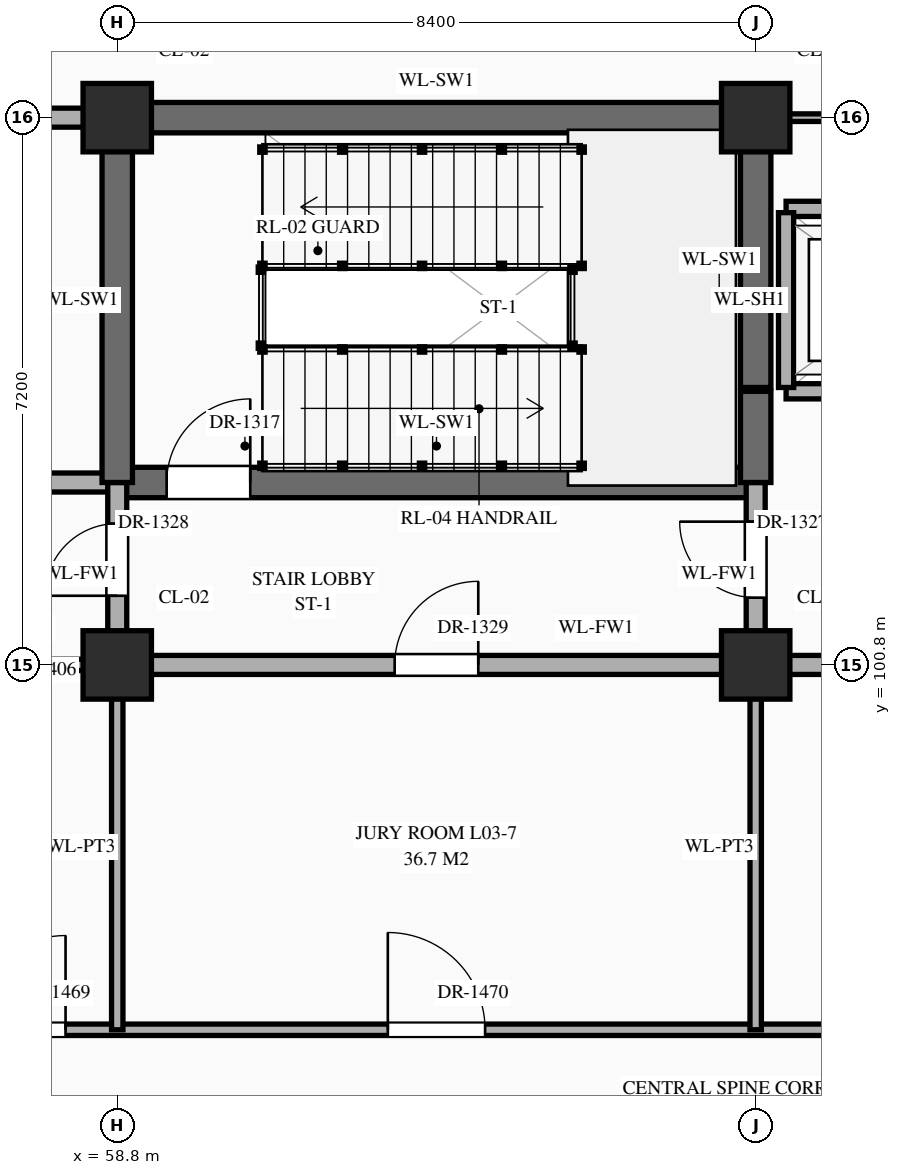
"""IFC4 building model, lengths in metres.
Left out: names, types, materials, properties, quantities, classifications, styles, units other than length and angle.
Written with IfcOpenShell. Run it as: python <this file> out.ifc"""

import sys

from ifc_helpers import new_model, si_unit, direction, frame, frame_2d, origin, origin_2d, place, context, subcontext, project, spatial, rectangle, extrude, element, fill, save


model = new_model("IFC4")
c1 = context("Model", 3, precision=1e-05, world=origin(), true_north=direction((0.0, 1.0)))
c2 = subcontext(c1, "Body", "Model", "MODEL_VIEW")
j1 = project(units=[si_unit("LENGTHUNIT", "METRE"), si_unit("PLANEANGLEUNIT", "RADIAN")], contexts=[c1])
p1 = place(None, origin())
s1 = spatial("IfcSite", under=j1, at=p1, CompositionType="ELEMENT")
p2 = place(p1, origin())
s2 = spatial("IfcBuilding", under=s1, at=p2, CompositionType="ELEMENT")
p3 = place(p2, frame((0.0, 0.0, 10.8)))
s3 = spatial("IfcBuildingStorey", under=s2, at=p3, CompositionType="ELEMENT", Elevation=10.8)
for number, where, z_axis, x_axis in (
    (1, (58.8, 100.8, 0.0), (0.0, 0.0, 1.0), (1.0, 0.0, 0.0)),
    (2, (58.8, 108.0, 0.0), (0.0, 0.0, 1.0), (1.0, 0.0, 0.0)),
    (3, (67.2, 100.8, 0.0), (0.0, 0.0, 1.0), (1.0, 0.0, 0.0)),
    (4, (67.2, 108.0, 0.0), (0.0, 0.0, 1.0), (1.0, 0.0, 0.0)),
):
    element("IfcColumn", number, at=place(p3, frame(where, z_axis=z_axis, x_axis=x_axis)), inside=s3, PredefinedType="COLUMN", context=c2, shape_type="SweptSolid", body=[
        extrude(rectangle(XDim=0.9, YDim=0.9, at=origin_2d()), origin(), (0.0, 0.0, 1.0), 5.4),
    ])
p4 = place(p3, frame((56.2, 96.0, 0.0), z_axis=(0.0, 0.0, 1.0), x_axis=(1.0, 0.0, 0.0)))
e5 = element("IfcWall", 5, at=p4, inside=s3, PredefinedType="STANDARD", context=c2, shape_type="SweptSolid", body=[
    extrude(rectangle(XDim=27.8, YDim=0.15, at=frame_2d((13.9, 0.0))), origin(), (0.0, 0.0, 1.0), 5.12),
])
p5 = place(p4, frame((0.68, 0.0, 0.0)))
e6 = element("IfcOpeningElement", 6, at=p5, cuts=e5, PredefinedType="OPENING", context=c2, shape_type="SweptSolid", body=[
    extrude(rectangle(XDim=1.24, YDim=2.3, at=frame_2d((0.62, 1.15))), frame((0.0, 0.087, 0.0), z_axis=(0.0, -1.0, 0.0), x_axis=(1.0, 0.0, 0.0)), (0.0, 0.0, 1.0), 0.174),
])
p6 = place(p4, frame((6.16, 0.0, 0.0)))
e7 = element("IfcOpeningElement", 7, at=p6, cuts=e5, PredefinedType="OPENING", context=c2, shape_type="SweptSolid", body=[
    extrude(rectangle(XDim=1.28, YDim=2.35, at=frame_2d((0.64, 1.175))), frame((0.0, 0.087, 0.0), z_axis=(0.0, -1.0, 0.0), x_axis=(1.0, 0.0, 0.0)), (0.0, 0.0, 1.0), 0.174),
])
p7 = place(p4, frame((14.73, 0.0, 0.0)))
e8 = element("IfcOpeningElement", 8, at=p7, cuts=e5, PredefinedType="OPENING", context=c2, shape_type="SweptSolid", body=[
    extrude(rectangle(XDim=0.94, YDim=2.3, at=frame_2d((0.47, 1.15))), frame((0.0, 0.087, 0.0), z_axis=(0.0, -1.0, 0.0), x_axis=(1.0, 0.0, 0.0)), (0.0, 0.0, 1.0), 0.174),
])
p8 = place(p4, frame((23.11, 0.0, 0.0)))
e9 = element("IfcOpeningElement", 9, at=p8, cuts=e5, PredefinedType="OPENING", context=c2, shape_type="SweptSolid", body=[
    extrude(rectangle(XDim=0.98, YDim=2.35, at=frame_2d((0.49, 1.175))), frame((0.0, 0.087, 0.0), z_axis=(0.0, -1.0, 0.0), x_axis=(1.0, 0.0, 0.0)), (0.0, 0.0, 1.0), 0.174),
])
p9 = place(p3, frame((56.2, 100.8, 0.0), z_axis=(0.0, 0.0, 1.0), x_axis=(1.0, 0.0, 0.0)))
e10 = element("IfcWall", 10, at=p9, inside=s3, PredefinedType="STANDARD", context=c2, shape_type="SweptSolid", body=[
    extrude(rectangle(XDim=2.6, YDim=0.15, at=frame_2d((1.3, 0.0))), origin(), (0.0, 0.0, 1.0), 4.27),
])
p10 = place(p9, frame((0.585, 0.0, 0.0)))
e11 = element("IfcOpeningElement", 11, at=p10, cuts=e10, PredefinedType="OPENING", context=c2, shape_type="SweptSolid", body=[
    extrude(rectangle(XDim=1.06, YDim=2.4, at=frame_2d((0.53, 1.2))), frame((0.0, 0.087, 0.0), z_axis=(0.0, -1.0, 0.0), x_axis=(1.0, 0.0, 0.0)), (0.0, 0.0, 1.0), 0.174),
])
p11 = place(p3, frame((58.8, 100.8, 0.0), z_axis=(0.0, 0.0, 1.0), x_axis=(1.0, 0.0, 0.0)))
e12 = element("IfcWall", 12, at=p11, inside=s3, PredefinedType="STANDARD", context=c2, shape_type="SweptSolid", body=[
    extrude(rectangle(XDim=12.6, YDim=0.25, at=frame_2d((6.3, 0.0))), origin(), (0.0, 0.0, 1.0), 4.27),
])
p12 = place(p11, frame((3.65, 0.0, 0.0)))
e13 = element("IfcOpeningElement", 13, at=p12, cuts=e12, PredefinedType="OPENING", context=c2, shape_type="SweptSolid", body=[
    extrude(rectangle(XDim=1.1, YDim=2.2, at=frame_2d((0.55, 1.1))), frame((0.0, 0.137, 0.0), z_axis=(0.0, -1.0, 0.0), x_axis=(1.0, 0.0, 0.0)), (0.0, 0.0, 1.0), 0.274),
])
p13 = place(p3, frame((54.6, 103.2, 0.0), z_axis=(0.0, 0.0, 1.0), x_axis=(1.0, 0.0, 0.0)))
e14 = element("IfcWall", 14, at=p13, inside=s3, PredefinedType="STANDARD", context=c2, shape_type="SweptSolid", body=[
    extrude(rectangle(XDim=4.2, YDim=0.25, at=frame_2d((2.1, 0.0))), origin(), (0.0, 0.0, 1.0), 5.12),
])
p14 = place(p13, frame((1.55, 0.0, 0.0)))
e15 = element("IfcOpeningElement", 15, at=p14, cuts=e14, PredefinedType="OPENING", context=c2, shape_type="SweptSolid", body=[
    extrude(rectangle(XDim=1.1, YDim=2.2, at=frame_2d((0.55, 1.1))), frame((0.0, 0.137, 0.0), z_axis=(0.0, -1.0, 0.0), x_axis=(1.0, 0.0, 0.0)), (0.0, 0.0, 1.0), 0.274),
])
p15 = place(p3, frame((58.8, 103.2, 0.0), z_axis=(0.0, 0.0, 1.0), x_axis=(1.0, 0.0, 0.0)))
e16 = element("IfcWall", 16, at=p15, inside=s3, PredefinedType="SHEAR", context=c2, shape_type="SweptSolid", body=[
    extrude(rectangle(XDim=8.4, YDim=0.4, at=frame_2d((4.2, 0.0))), origin(), (0.0, 0.0, 1.0), 5.12),
])
p16 = place(p15, frame((0.65, 0.0, 0.0)))
e17 = element("IfcOpeningElement", 17, at=p16, cuts=e16, PredefinedType="OPENING", context=c2, shape_type="SweptSolid", body=[
    extrude(rectangle(XDim=1.1, YDim=2.2, at=frame_2d((0.55, 1.1))), frame((0.0, 0.212, 0.0), z_axis=(0.0, -1.0, 0.0), x_axis=(1.0, 0.0, 0.0)), (0.0, 0.0, 1.0), 0.424),
])
p17 = place(p3, frame((67.6, 104.4, 0.0), z_axis=(0.0, 0.0, 1.0), x_axis=(1.0, 0.0, 0.0)))
e18 = element("IfcWall", 18, at=p17, inside=s3, PredefinedType="STANDARD", context=c2, shape_type="SweptSolid", body=[
    extrude(rectangle(XDim=3.0, YDim=0.2, at=frame_2d((1.5, 0.0))), origin(), (0.0, 0.0, 1.0), 5.12),
])
p18 = place(p17, frame((0.9, 0.0, 0.0)))
e19 = element("IfcOpeningElement", 19, at=p18, cuts=e18, PredefinedType="OPENING", context=c2, shape_type="SweptSolid", body=[
    extrude(rectangle(XDim=1.2, YDim=2.15, at=frame_2d((0.6, 1.075))), frame((0.0, 0.112, 0.0), z_axis=(0.0, -1.0, 0.0), x_axis=(1.0, 0.0, 0.0)), (0.0, 0.0, 1.0), 0.224),
])
p19 = place(p3, frame((67.6, 106.8, 0.0), z_axis=(0.0, 0.0, 1.0), x_axis=(1.0, 0.0, 0.0)))
e20 = element("IfcWall", 20, at=p19, inside=s3, PredefinedType="STANDARD", context=c2, shape_type="SweptSolid", body=[
    extrude(rectangle(XDim=3.0, YDim=0.2, at=frame_2d((1.5, 0.0))), origin(), (0.0, 0.0, 1.0), 5.12),
])
p20 = place(p3, frame((54.6, 108.0, 0.0), z_axis=(0.0, 0.0, 1.0), x_axis=(1.0, 0.0, 0.0)))
e21 = element("IfcWall", 21, at=p20, inside=s3, PredefinedType="STANDARD", context=c2, shape_type="SweptSolid", body=[
    extrude(rectangle(XDim=4.2, YDim=0.25, at=frame_2d((2.1, 0.0))), origin(), (0.0, 0.0, 1.0), 4.27),
])
p21 = place(p20, frame((1.365, 0.0, 0.0)))
e22 = element("IfcOpeningElement", 22, at=p21, cuts=e21, PredefinedType="OPENING", context=c2, shape_type="SweptSolid", body=[
    extrude(rectangle(XDim=1.1, YDim=2.2, at=frame_2d((0.55, 1.1))), frame((0.0, 0.137, 0.0), z_axis=(0.0, -1.0, 0.0), x_axis=(1.0, 0.0, 0.0)), (0.0, 0.0, 1.0), 0.274),
])
p22 = place(p3, frame((58.8, 108.0, 0.0), z_axis=(0.0, 0.0, 1.0), x_axis=(1.0, 0.0, 0.0)))
e23 = element("IfcWall", 23, at=p22, inside=s3, PredefinedType="SHEAR", context=c2, shape_type="SweptSolid", body=[
    extrude(rectangle(XDim=8.4, YDim=0.4, at=frame_2d((4.2, 0.0))), origin(), (0.0, 0.0, 1.0), 5.12),
])
p23 = place(p3, frame((67.25, 108.0, 0.0), z_axis=(0.0, 0.0, 1.0), x_axis=(1.0, 0.0, 0.0)))
e24 = element("IfcWall", 24, at=p23, inside=s3, PredefinedType="STANDARD", context=c2, shape_type="SweptSolid", body=[
    extrude(rectangle(XDim=4.1, YDim=0.1, at=frame_2d((2.05, 0.0))), origin(), (0.0, 0.0, 1.0), 4.27),
])
p24 = place(p3, frame((58.8, 96.0, 0.0), z_axis=(0.0, 0.0, 1.0), x_axis=(0.0, 1.0, 0.0)))
e25 = element("IfcWall", 25, at=p24, inside=s3, PredefinedType="STANDARD", context=c2, shape_type="SweptSolid", body=[
    extrude(rectangle(XDim=4.8, YDim=0.15, at=frame_2d((2.4, 0.0))), origin(), (0.0, 0.0, 1.0), 4.37),
])
p25 = place(p3, frame((58.8, 100.8, 0.0), z_axis=(0.0, 0.0, 1.0), x_axis=(0.0, 1.0, 0.0)))
e26 = element("IfcWall", 26, at=p25, inside=s3, PredefinedType="STANDARD", context=c2, shape_type="SweptSolid", body=[
    extrude(rectangle(XDim=2.4, YDim=0.25, at=frame_2d((1.2, 0.0))), origin(), (0.0, 0.0, 1.0), 4.37),
])
p26 = place(p25, frame((0.91, 0.0, 0.0)))
e27 = element("IfcOpeningElement", 27, at=p26, cuts=e26, PredefinedType="OPENING", context=c2, shape_type="SweptSolid", body=[
    extrude(rectangle(XDim=0.95, YDim=2.15, at=frame_2d((0.475, 1.075))), frame((0.0, 0.137, 0.0), z_axis=(0.0, -1.0, 0.0), x_axis=(1.0, 0.0, 0.0)), (0.0, 0.0, 1.0), 0.274),
])
p27 = place(p3, frame((58.8, 103.2, 0.0), z_axis=(0.0, 0.0, 1.0), x_axis=(0.0, 1.0, 0.0)))
e28 = element("IfcWall", 28, at=p27, inside=s3, PredefinedType="SHEAR", context=c2, shape_type="SweptSolid", body=[
    extrude(rectangle(XDim=4.8, YDim=0.4, at=frame_2d((2.4, 0.0))), origin(), (0.0, 0.0, 1.0), 5.12),
])
p28 = place(p3, frame((67.2, 96.0, 0.0), z_axis=(0.0, 0.0, 1.0), x_axis=(0.0, 1.0, 0.0)))
e29 = element("IfcWall", 29, at=p28, inside=s3, PredefinedType="STANDARD", context=c2, shape_type="SweptSolid", body=[
    extrude(rectangle(XDim=4.8, YDim=0.15, at=frame_2d((2.4, 0.0))), origin(), (0.0, 0.0, 1.0), 4.37),
])
p29 = place(p3, frame((67.2, 100.8, 0.0), z_axis=(0.0, 0.0, 1.0), x_axis=(0.0, 1.0, 0.0)))
e30 = element("IfcWall", 30, at=p29, inside=s3, PredefinedType="STANDARD", context=c2, shape_type="SweptSolid", body=[
    extrude(rectangle(XDim=2.4, YDim=0.25, at=frame_2d((1.2, 0.0))), origin(), (0.0, 0.0, 1.0), 4.37),
])
p30 = place(p29, frame((0.885, 0.0, 0.0)))
e31 = element("IfcOpeningElement", 31, at=p30, cuts=e30, PredefinedType="OPENING", context=c2, shape_type="SweptSolid", body=[
    extrude(rectangle(XDim=1.0, YDim=2.2, at=frame_2d((0.5, 1.1))), frame((0.0, 0.137, 0.0), z_axis=(0.0, -1.0, 0.0), x_axis=(1.0, 0.0, 0.0)), (0.0, 0.0, 1.0), 0.274),
])
p31 = place(p3, frame((67.2, 103.2, 0.0), z_axis=(0.0, 0.0, 1.0), x_axis=(0.0, 1.0, 0.0)))
e32 = element("IfcWall", 32, at=p31, inside=s3, PredefinedType="SHEAR", context=c2, shape_type="SweptSolid", body=[
    extrude(rectangle(XDim=1.2, YDim=0.4, at=frame_2d((0.6, 0.0))), origin(), (0.0, 0.0, 1.0), 5.12),
])
p32 = place(p3, frame((67.2, 104.45, 0.0), z_axis=(0.0, 0.0, 1.0), x_axis=(0.0, 1.0, 0.0)))
e33 = element("IfcWall", 33, at=p32, inside=s3, PredefinedType="SHEAR", context=c2, shape_type="SweptSolid", body=[
    extrude(rectangle(XDim=3.5, YDim=0.4, at=frame_2d((1.75, 0.0))), origin(), (0.0, 0.0, 1.0), 5.12),
])
p33 = place(p3, frame((67.6, 104.45, 0.0), z_axis=(0.0, 0.0, 1.0), x_axis=(0.0, 1.0, 0.0)))
e34 = element("IfcWall", 34, at=p33, inside=s3, PredefinedType="STANDARD", context=c2, shape_type="SweptSolid", body=[
    extrude(rectangle(XDim=2.3, YDim=0.2, at=frame_2d((1.15, 0.0))), origin(), (0.0, 0.0, 1.0), 5.12),
])
p34 = place(p16, origin())
e35 = element("IfcDoor", 35, at=p34, inside=s3, OperationType="SINGLE_SWING_RIGHT", PredefinedType="DOOR", context=c2, shape_type="SweptSolid", body=[
    extrude(rectangle(XDim=1.1, YDim=2.2, at=frame_2d((0.55, 1.1))), frame((0.0, 0.025, 0.0), z_axis=(0.0, -1.0, 0.0), x_axis=(1.0, 0.0, 0.0)), (0.0, 0.0, 1.0), 0.05),
])
fill(e17, e35)
p35 = place(p30, origin())
e36 = element("IfcDoor", 36, at=p35, inside=s3, OperationType="SINGLE_SWING_RIGHT", PredefinedType="DOOR", context=c2, shape_type="SweptSolid", body=[
    extrude(rectangle(XDim=1.0, YDim=2.2, at=frame_2d((0.5, 1.1))), frame((0.0, 0.025, 0.0), z_axis=(0.0, -1.0, 0.0), x_axis=(1.0, 0.0, 0.0)), (0.0, 0.0, 1.0), 0.05),
])
fill(e31, e36)
p36 = place(p26, origin())
e37 = element("IfcDoor", 37, at=p36, inside=s3, OperationType="SINGLE_SWING_LEFT", PredefinedType="DOOR", context=c2, shape_type="SweptSolid", body=[
    extrude(rectangle(XDim=0.95, YDim=2.15, at=frame_2d((0.475, 1.075))), frame((0.0, 0.025, 0.0), z_axis=(0.0, -1.0, 0.0), x_axis=(1.0, 0.0, 0.0)), (0.0, 0.0, 1.0), 0.05),
])
fill(e27, e37)
p37 = place(p12, origin())
e38 = element("IfcDoor", 38, at=p37, inside=s3, OperationType="SINGLE_SWING_RIGHT", PredefinedType="DOOR", context=c2, shape_type="SweptSolid", body=[
    extrude(rectangle(XDim=1.1, YDim=2.2, at=frame_2d((0.55, 1.1))), frame((0.0, 0.025, 0.0), z_axis=(0.0, -1.0, 0.0), x_axis=(1.0, 0.0, 0.0)), (0.0, 0.0, 1.0), 0.05),
])
fill(e13, e38)
p38 = place(p5, origin())
e39 = element("IfcDoor", 39, at=p38, inside=s3, OperationType="SINGLE_SWING_RIGHT", PredefinedType="DOOR", context=c2, shape_type="SweptSolid", body=[
    extrude(rectangle(XDim=1.24, YDim=2.3, at=frame_2d((0.62, 1.15))), frame((0.0, 0.025, 0.0), z_axis=(0.0, -1.0, 0.0), x_axis=(1.0, 0.0, 0.0)), (0.0, 0.0, 1.0), 0.05),
])
fill(e6, e39)
p39 = place(p6, origin())
e40 = element("IfcDoor", 40, at=p39, inside=s3, OperationType="SINGLE_SWING_LEFT", PredefinedType="DOOR", context=c2, shape_type="SweptSolid", body=[
    extrude(rectangle(XDim=1.28, YDim=2.35, at=frame_2d((0.64, 1.175))), frame((0.0, 0.025, 0.0), z_axis=(0.0, -1.0, 0.0), x_axis=(1.0, 0.0, 0.0)), (0.0, 0.0, 1.0), 0.05),
])
fill(e7, e40)
save(model, sys.argv[1])
